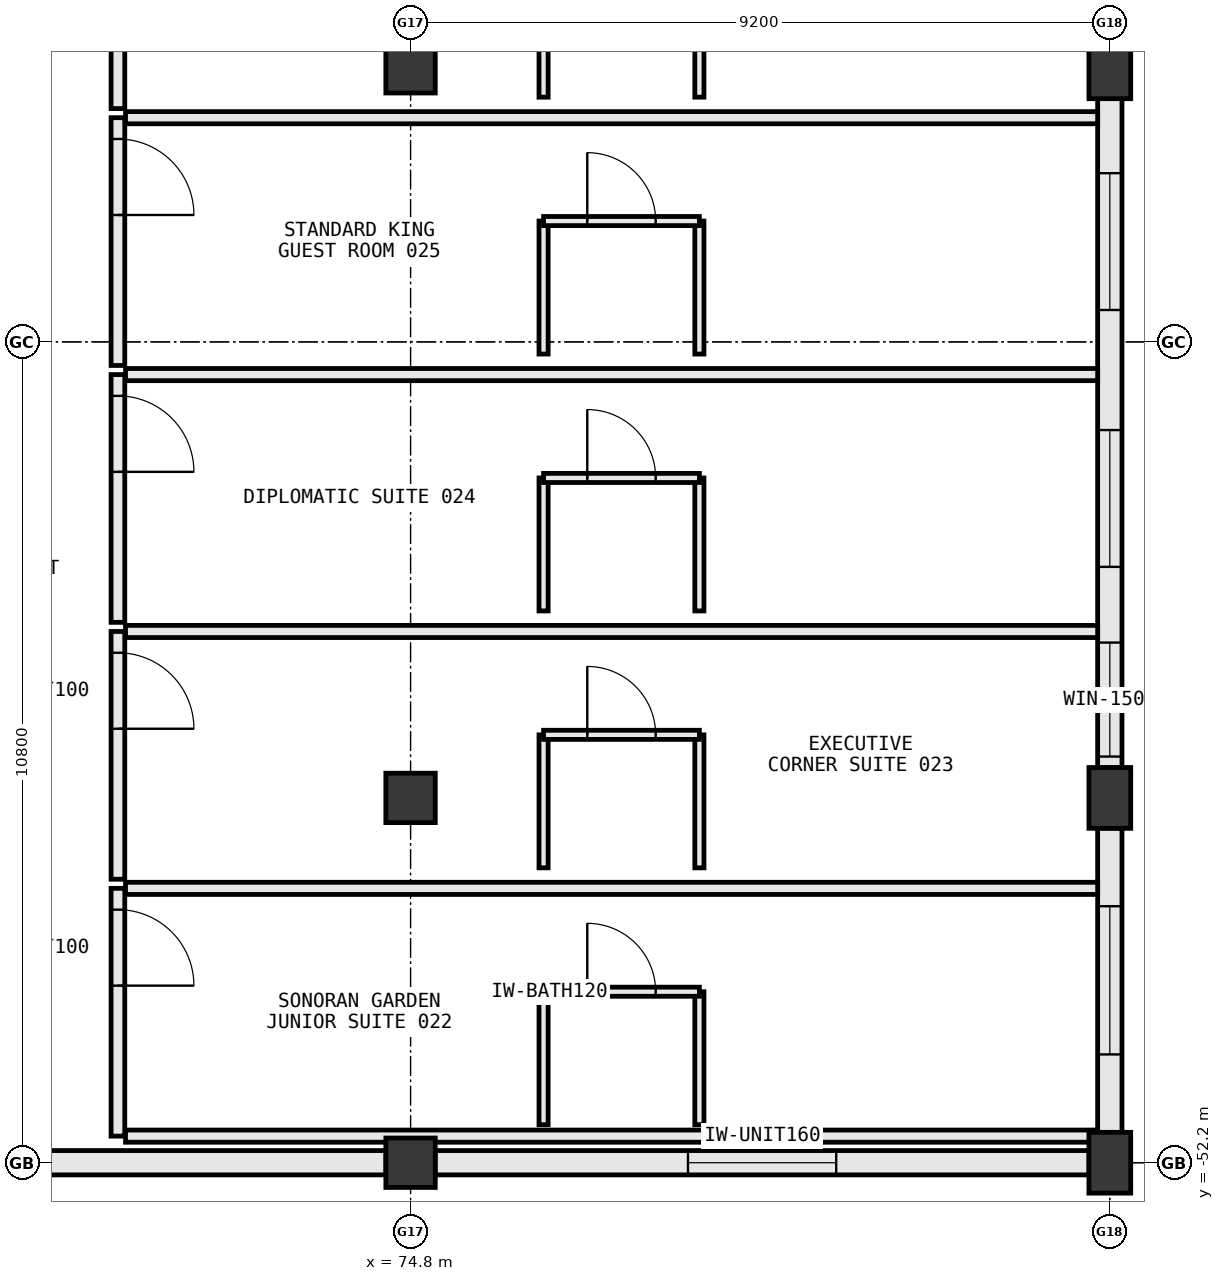
"""IFC4 building model, lengths in metres.
Left out: names, types, materials, properties, quantities, classifications, styles, units other than length and angle.
Written with IfcOpenShell. Run it as: python <this file> out.ifc"""

import sys

from ifc_helpers import new_model, si_unit, direction, frame, frame_2d, origin, origin_2d, place, context, subcontext, project, spatial, rectangle, extrude, element, fill, save


model = new_model("IFC4")
c1 = context("Model", 3, precision=1e-05, world=origin(), true_north=direction((0.0, 1.0)))
c2 = subcontext(c1, "Body", "Model", "MODEL_VIEW")
j1 = project(units=[si_unit("LENGTHUNIT", "METRE"), si_unit("PLANEANGLEUNIT", "RADIAN")], contexts=[c1])
p1 = place(None, origin())
s1 = spatial("IfcSite", under=j1, at=p1, CompositionType="ELEMENT")
p2 = place(p1, origin())
s2 = spatial("IfcBuilding", under=s1, at=p2, CompositionType="ELEMENT")
p3 = place(p2, frame((0.0, 0.0, 10.8)))
s3 = spatial("IfcBuildingStorey", under=s2, at=p3, CompositionType="ELEMENT", Elevation=10.8)
for number, where, z_axis, x_axis in (
    (1, (74.8, -52.2, 0.0), (0.0, 0.0, 1.0), (1.0, 0.0, 0.0)),
    (2, (74.8, -47.4, 0.0), (0.0, 0.0, 1.0), (1.0, 0.0, 0.0)),
    (3, (74.8, -37.8, 0.0), (0.0, 0.0, 1.0), (1.0, 0.0, 0.0)),
):
    element("IfcColumn", number, at=place(p3, frame(where, z_axis=z_axis, x_axis=x_axis)), inside=s3, PredefinedType="COLUMN", context=c2, shape_type="SweptSolid", body=[
        extrude(rectangle(XDim=0.65, YDim=0.65, at=origin_2d()), origin(), (0.0, 0.0, 1.0), 5.4),
    ])
for number, where, z_axis, x_axis in (
    (4, (84.0, -52.2, 0.0), (0.0, 0.0, 1.0), (1.0, 0.0, 0.0)),
    (5, (84.0, -47.4, 0.0), (0.0, 0.0, 1.0), (1.0, 0.0, 0.0)),
    (6, (84.0, -37.8, 0.0), (0.0, 0.0, 1.0), (1.0, 0.0, 0.0)),
):
    element("IfcColumn", number, at=place(p3, frame(where, z_axis=z_axis, x_axis=x_axis)), inside=s3, PredefinedType="PILASTER", context=c2, shape_type="SweptSolid", body=[
        extrude(rectangle(XDim=0.55, YDim=0.8, at=origin_2d()), origin(), (0.0, 0.0, 1.0), 5.4),
    ])
p4 = place(p3, frame((67.811, -52.2, 0.0), z_axis=(0.0, 0.0, 1.0), x_axis=(1.0, 0.0, 0.0)))
e7 = element("IfcWall", 7, at=p4, inside=s3, PredefinedType="STANDARD", context=c2, shape_type="SweptSolid", body=[
    extrude(rectangle(XDim=6.667, YDim=0.32, at=frame_2d((3.333, 0.0))), origin(), (0.0, 0.0, 1.0), 4.183),
])
p5 = place(p3, frame((75.123, -52.2, 0.0), z_axis=(0.0, 0.0, 1.0), x_axis=(1.0, 0.0, 0.0)))
e8 = element("IfcWall", 8, at=p5, inside=s3, PredefinedType="STANDARD", context=c2, shape_type="SweptSolid", body=[
    extrude(rectangle(XDim=8.604, YDim=0.32, at=frame_2d((4.302, 0.0))), origin(), (0.0, 0.0, 1.0), 4.183),
])
p6 = place(p5, frame((3.327, 0.0, 0.85)))
e9 = element("IfcOpeningElement", 9, at=p6, cuts=e8, PredefinedType="OPENING", context=c2, shape_type="SweptSolid", body=[
    extrude(rectangle(XDim=1.95, YDim=1.9, at=frame_2d((0.975, 0.95))), frame((0.0, 0.172, 0.0), z_axis=(0.0, -1.0, 0.0), x_axis=(1.0, 0.0, 0.0)), (0.0, 0.0, 1.0), 0.344),
])
p7 = place(p3, frame((84.0, -51.802, 0.0), z_axis=(0.0, 0.0, 1.0), x_axis=(0.0, 1.0, 0.0)))
e10 = element("IfcWall", 10, at=p7, inside=s3, PredefinedType="STANDARD", context=c2, shape_type="SweptSolid", body=[
    extrude(rectangle(XDim=4.004, YDim=0.32, at=frame_2d((2.002, 0.0))), origin(), (0.0, 0.0, 1.0), 4.332),
])
p8 = place(p7, frame((1.027, 0.0, 0.85)))
e11 = element("IfcOpeningElement", 11, at=p8, cuts=e10, PredefinedType="OPENING", context=c2, shape_type="SweptSolid", body=[
    extrude(rectangle(XDim=1.95, YDim=1.9, at=frame_2d((0.975, 0.95))), frame((0.0, 0.172, 0.0), z_axis=(0.0, -1.0, 0.0), x_axis=(1.0, 0.0, 0.0)), (0.0, 0.0, 1.0), 0.344),
])
p9 = place(p3, frame((84.0, -47.002, 0.0), z_axis=(0.0, 0.0, 1.0), x_axis=(0.0, 1.0, 0.0)))
e12 = element("IfcWall", 12, at=p9, inside=s3, PredefinedType="STANDARD", context=c2, shape_type="SweptSolid", body=[
    extrude(rectangle(XDim=8.804, YDim=0.32, at=frame_2d((4.402, 0.0))), origin(), (0.0, 0.0, 1.0), 4.332),
])
p10 = place(p9, frame((0.146, 0.0, 0.85)))
e13 = element("IfcOpeningElement", 13, at=p10, cuts=e12, PredefinedType="OPENING", context=c2, shape_type="SweptSolid", body=[
    extrude(rectangle(XDim=1.5, YDim=1.75, at=frame_2d((0.75, 0.875))), frame((0.0, 0.172, 0.0), z_axis=(0.0, -1.0, 0.0), x_axis=(1.0, 0.0, 0.0)), (0.0, 0.0, 1.0), 0.344),
])
p11 = place(p9, frame((2.642, 0.0, 0.85)))
e14 = element("IfcOpeningElement", 14, at=p11, cuts=e12, PredefinedType="OPENING", context=c2, shape_type="SweptSolid", body=[
    extrude(rectangle(XDim=1.8, YDim=1.85, at=frame_2d((0.9, 0.925))), frame((0.0, 0.172, 0.0), z_axis=(0.0, -1.0, 0.0), x_axis=(1.0, 0.0, 0.0)), (0.0, 0.0, 1.0), 0.344),
])
p12 = place(p9, frame((6.022, 0.0, 0.85)))
e15 = element("IfcOpeningElement", 15, at=p12, cuts=e12, PredefinedType="OPENING", context=c2, shape_type="SweptSolid", body=[
    extrude(rectangle(XDim=1.8, YDim=1.85, at=frame_2d((0.9, 0.925))), frame((0.0, 0.172, 0.0), z_axis=(0.0, -1.0, 0.0), x_axis=(1.0, 0.0, 0.0)), (0.0, 0.0, 1.0), 0.344),
])
p13 = place(p3, frame((70.95, -48.59, 0.0), z_axis=(0.0, 0.0, 1.0), x_axis=(0.0, -1.0, 0.0)))
e16 = element("IfcWall", 16, at=p13, inside=s3, PredefinedType="PARTITIONING", context=c2, shape_type="SweptSolid", body=[
    extrude(rectangle(XDim=3.26, YDim=0.18, at=frame_2d((1.63, 0.0))), origin(), (0.0, 0.0, 1.0), 4.8),
])
p14 = place(p13, frame((0.28, 0.0, 0.0)))
e17 = element("IfcOpeningElement", 17, at=p14, cuts=e16, PredefinedType="OPENING", context=c2, shape_type="SweptSolid", body=[
    extrude(rectangle(XDim=1.0, YDim=2.2, at=frame_2d((0.5, 1.1))), frame((0.0, 0.102, 0.0), z_axis=(0.0, -1.0, 0.0), x_axis=(1.0, 0.0, 0.0)), (0.0, 0.0, 1.0), 0.204),
])
p15 = place(p3, frame((71.05, -51.85, 0.0), z_axis=(0.0, 0.0, 1.0), x_axis=(1.0, 0.0, 0.0)))
e18 = element("IfcWall", 18, at=p15, inside=s3, PredefinedType="PARTITIONING", context=c2, shape_type="SweptSolid", body=[
    extrude(rectangle(XDim=12.79, YDim=0.16, at=frame_2d((6.395, 0.0))), origin(), (0.0, 0.0, 1.0), 4.183),
])
p16 = place(p3, frame((71.05, -48.59, 0.0), z_axis=(0.0, 0.0, 1.0), x_axis=(1.0, 0.0, 0.0)))
e19 = element("IfcWall", 19, at=p16, inside=s3, PredefinedType="PARTITIONING", context=c2, shape_type="SweptSolid", body=[
    extrude(rectangle(XDim=12.79, YDim=0.16, at=frame_2d((6.395, 0.0))), origin(), (0.0, 0.0, 1.0), 4.8),
])
for number, where, z_axis, x_axis in (
    (20, (76.55, -51.7, 0.0), (0.0, 0.0, 1.0), (0.0, 1.0, 0.0)),
    (21, (78.6, -51.7, 0.0), (0.0, 0.0, 1.0), (0.0, 1.0, 0.0)),
):
    element("IfcWall", number, at=place(p3, frame(where, z_axis=z_axis, x_axis=x_axis)), inside=s3, PredefinedType="PARTITIONING", context=c2, shape_type="SweptSolid", body=[
        extrude(rectangle(XDim=1.75, YDim=0.12, at=frame_2d((0.875, 0.0))), origin(), (0.0, 0.0, 1.0), 4.8),
    ])
p17 = place(p3, frame((76.55, -49.95, 0.0), z_axis=(0.0, 0.0, 1.0), x_axis=(1.0, 0.0, 0.0)))
e22 = element("IfcWall", 22, at=p17, inside=s3, PredefinedType="PARTITIONING", context=c2, shape_type="SweptSolid", body=[
    extrude(rectangle(XDim=2.05, YDim=0.12, at=frame_2d((1.025, 0.0))), origin(), (0.0, 0.0, 1.0), 4.8),
])
p18 = place(p17, frame((0.575, 0.0, 0.0)))
e23 = element("IfcOpeningElement", 23, at=p18, cuts=e22, PredefinedType="OPENING", context=c2, shape_type="SweptSolid", body=[
    extrude(rectangle(XDim=0.9, YDim=2.15, at=frame_2d((0.45, 1.075))), frame((0.0, 0.072, 0.0), z_axis=(0.0, -1.0, 0.0), x_axis=(1.0, 0.0, 0.0)), (0.0, 0.0, 1.0), 0.144),
])
p19 = place(p3, frame((70.95, -45.21, 0.0), z_axis=(0.0, 0.0, 1.0), x_axis=(0.0, -1.0, 0.0)))
e24 = element("IfcWall", 24, at=p19, inside=s3, PredefinedType="PARTITIONING", context=c2, shape_type="SweptSolid", body=[
    extrude(rectangle(XDim=3.26, YDim=0.18, at=frame_2d((1.63, 0.0))), origin(), (0.0, 0.0, 1.0), 4.8),
])
p20 = place(p19, frame((0.28, 0.0, 0.0)))
e25 = element("IfcOpeningElement", 25, at=p20, cuts=e24, PredefinedType="OPENING", context=c2, shape_type="SweptSolid", body=[
    extrude(rectangle(XDim=1.0, YDim=2.2, at=frame_2d((0.5, 1.1))), frame((0.0, 0.102, 0.0), z_axis=(0.0, -1.0, 0.0), x_axis=(1.0, 0.0, 0.0)), (0.0, 0.0, 1.0), 0.204),
])
p21 = place(p3, frame((71.05, -45.21, 0.0), z_axis=(0.0, 0.0, 1.0), x_axis=(1.0, 0.0, 0.0)))
e26 = element("IfcWall", 26, at=p21, inside=s3, PredefinedType="PARTITIONING", context=c2, shape_type="SweptSolid", body=[
    extrude(rectangle(XDim=12.79, YDim=0.16, at=frame_2d((6.395, 0.0))), origin(), (0.0, 0.0, 1.0), 4.8),
])
for number, where, z_axis, x_axis in (
    (27, (76.55, -48.32, 0.0), (0.0, 0.0, 1.0), (0.0, 1.0, 0.0)),
    (28, (78.6, -48.32, 0.0), (0.0, 0.0, 1.0), (0.0, 1.0, 0.0)),
):
    element("IfcWall", number, at=place(p3, frame(where, z_axis=z_axis, x_axis=x_axis)), inside=s3, PredefinedType="PARTITIONING", context=c2, shape_type="SweptSolid", body=[
        extrude(rectangle(XDim=1.75, YDim=0.12, at=frame_2d((0.875, 0.0))), origin(), (0.0, 0.0, 1.0), 4.8),
    ])
p22 = place(p3, frame((76.55, -46.57, 0.0), z_axis=(0.0, 0.0, 1.0), x_axis=(1.0, 0.0, 0.0)))
e29 = element("IfcWall", 29, at=p22, inside=s3, PredefinedType="PARTITIONING", context=c2, shape_type="SweptSolid", body=[
    extrude(rectangle(XDim=2.05, YDim=0.12, at=frame_2d((1.025, 0.0))), origin(), (0.0, 0.0, 1.0), 4.8),
])
p23 = place(p22, frame((0.575, 0.0, 0.0)))
e30 = element("IfcOpeningElement", 30, at=p23, cuts=e29, PredefinedType="OPENING", context=c2, shape_type="SweptSolid", body=[
    extrude(rectangle(XDim=0.9, YDim=2.15, at=frame_2d((0.45, 1.075))), frame((0.0, 0.072, 0.0), z_axis=(0.0, -1.0, 0.0), x_axis=(1.0, 0.0, 0.0)), (0.0, 0.0, 1.0), 0.144),
])
p24 = place(p3, frame((70.95, -41.83, 0.0), z_axis=(0.0, 0.0, 1.0), x_axis=(0.0, -1.0, 0.0)))
e31 = element("IfcWall", 31, at=p24, inside=s3, PredefinedType="PARTITIONING", context=c2, shape_type="SweptSolid", body=[
    extrude(rectangle(XDim=3.26, YDim=0.18, at=frame_2d((1.63, 0.0))), origin(), (0.0, 0.0, 1.0), 4.8),
])
p25 = place(p24, frame((0.28, 0.0, 0.0)))
e32 = element("IfcOpeningElement", 32, at=p25, cuts=e31, PredefinedType="OPENING", context=c2, shape_type="SweptSolid", body=[
    extrude(rectangle(XDim=1.0, YDim=2.2, at=frame_2d((0.5, 1.1))), frame((0.0, 0.102, 0.0), z_axis=(0.0, -1.0, 0.0), x_axis=(1.0, 0.0, 0.0)), (0.0, 0.0, 1.0), 0.204),
])
p26 = place(p3, frame((71.05, -41.83, 0.0), z_axis=(0.0, 0.0, 1.0), x_axis=(1.0, 0.0, 0.0)))
e33 = element("IfcWall", 33, at=p26, inside=s3, PredefinedType="PARTITIONING", context=c2, shape_type="SweptSolid", body=[
    extrude(rectangle(XDim=12.79, YDim=0.16, at=frame_2d((6.395, 0.0))), origin(), (0.0, 0.0, 1.0), 4.8),
])
for number, where, z_axis, x_axis in (
    (34, (76.55, -44.94, 0.0), (0.0, 0.0, 1.0), (0.0, 1.0, 0.0)),
    (35, (78.6, -44.94, 0.0), (0.0, 0.0, 1.0), (0.0, 1.0, 0.0)),
):
    element("IfcWall", number, at=place(p3, frame(where, z_axis=z_axis, x_axis=x_axis)), inside=s3, PredefinedType="PARTITIONING", context=c2, shape_type="SweptSolid", body=[
        extrude(rectangle(XDim=1.75, YDim=0.12, at=frame_2d((0.875, 0.0))), origin(), (0.0, 0.0, 1.0), 4.8),
    ])
p27 = place(p3, frame((76.55, -43.19, 0.0), z_axis=(0.0, 0.0, 1.0), x_axis=(1.0, 0.0, 0.0)))
e36 = element("IfcWall", 36, at=p27, inside=s3, PredefinedType="PARTITIONING", context=c2, shape_type="SweptSolid", body=[
    extrude(rectangle(XDim=2.05, YDim=0.12, at=frame_2d((1.025, 0.0))), origin(), (0.0, 0.0, 1.0), 4.8),
])
p28 = place(p27, frame((0.575, 0.0, 0.0)))
e37 = element("IfcOpeningElement", 37, at=p28, cuts=e36, PredefinedType="OPENING", context=c2, shape_type="SweptSolid", body=[
    extrude(rectangle(XDim=0.9, YDim=2.15, at=frame_2d((0.45, 1.075))), frame((0.0, 0.072, 0.0), z_axis=(0.0, -1.0, 0.0), x_axis=(1.0, 0.0, 0.0)), (0.0, 0.0, 1.0), 0.144),
])
p29 = place(p3, frame((70.95, -38.45, 0.0), z_axis=(0.0, 0.0, 1.0), x_axis=(0.0, -1.0, 0.0)))
e38 = element("IfcWall", 38, at=p29, inside=s3, PredefinedType="PARTITIONING", context=c2, shape_type="SweptSolid", body=[
    extrude(rectangle(XDim=3.26, YDim=0.18, at=frame_2d((1.63, 0.0))), origin(), (0.0, 0.0, 1.0), 4.8),
])
p30 = place(p29, frame((0.28, 0.0, 0.0)))
e39 = element("IfcOpeningElement", 39, at=p30, cuts=e38, PredefinedType="OPENING", context=c2, shape_type="SweptSolid", body=[
    extrude(rectangle(XDim=1.0, YDim=2.2, at=frame_2d((0.5, 1.1))), frame((0.0, 0.102, 0.0), z_axis=(0.0, -1.0, 0.0), x_axis=(1.0, 0.0, 0.0)), (0.0, 0.0, 1.0), 0.204),
])
p31 = place(p3, frame((71.05, -38.45, 0.0), z_axis=(0.0, 0.0, 1.0), x_axis=(1.0, 0.0, 0.0)))
e40 = element("IfcWall", 40, at=p31, inside=s3, PredefinedType="PARTITIONING", context=c2, shape_type="SweptSolid", body=[
    extrude(rectangle(XDim=12.79, YDim=0.16, at=frame_2d((6.395, 0.0))), origin(), (0.0, 0.0, 1.0), 4.8),
])
for number, where, z_axis, x_axis in (
    (41, (76.55, -41.56, 0.0), (0.0, 0.0, 1.0), (0.0, 1.0, 0.0)),
    (42, (78.6, -41.56, 0.0), (0.0, 0.0, 1.0), (0.0, 1.0, 0.0)),
):
    element("IfcWall", number, at=place(p3, frame(where, z_axis=z_axis, x_axis=x_axis)), inside=s3, PredefinedType="PARTITIONING", context=c2, shape_type="SweptSolid", body=[
        extrude(rectangle(XDim=1.75, YDim=0.12, at=frame_2d((0.875, 0.0))), origin(), (0.0, 0.0, 1.0), 4.8),
    ])
p32 = place(p3, frame((76.55, -39.81, 0.0), z_axis=(0.0, 0.0, 1.0), x_axis=(1.0, 0.0, 0.0)))
e43 = element("IfcWall", 43, at=p32, inside=s3, PredefinedType="PARTITIONING", context=c2, shape_type="SweptSolid", body=[
    extrude(rectangle(XDim=2.05, YDim=0.12, at=frame_2d((1.025, 0.0))), origin(), (0.0, 0.0, 1.0), 4.8),
])
p33 = place(p32, frame((0.575, 0.0, 0.0)))
e44 = element("IfcOpeningElement", 44, at=p33, cuts=e43, PredefinedType="OPENING", context=c2, shape_type="SweptSolid", body=[
    extrude(rectangle(XDim=0.9, YDim=2.15, at=frame_2d((0.45, 1.075))), frame((0.0, 0.072, 0.0), z_axis=(0.0, -1.0, 0.0), x_axis=(1.0, 0.0, 0.0)), (0.0, 0.0, 1.0), 0.144),
])
p34 = place(p3, frame((70.95, -35.07, 0.0), z_axis=(0.0, 0.0, 1.0), x_axis=(0.0, -1.0, 0.0)))
e45 = element("IfcWall", 45, at=p34, inside=s3, PredefinedType="PARTITIONING", context=c2, shape_type="SweptSolid", body=[
    extrude(rectangle(XDim=3.26, YDim=0.18, at=frame_2d((1.63, 0.0))), origin(), (0.0, 0.0, 1.0), 4.8),
])
p35 = place(p34, frame((0.28, 0.0, 0.0)))
e46 = element("IfcOpeningElement", 46, at=p35, cuts=e45, PredefinedType="OPENING", context=c2, shape_type="SweptSolid", body=[
    extrude(rectangle(XDim=1.0, YDim=2.2, at=frame_2d((0.5, 1.1))), frame((0.0, 0.102, 0.0), z_axis=(0.0, -1.0, 0.0), x_axis=(1.0, 0.0, 0.0)), (0.0, 0.0, 1.0), 0.204),
])
for number, where, z_axis, x_axis in (
    (47, (76.55, -38.18, 0.0), (0.0, 0.0, 1.0), (0.0, 1.0, 0.0)),
    (48, (78.6, -38.18, 0.0), (0.0, 0.0, 1.0), (0.0, 1.0, 0.0)),
):
    element("IfcWall", number, at=place(p3, frame(where, z_axis=z_axis, x_axis=x_axis)), inside=s3, PredefinedType="PARTITIONING", context=c2, shape_type="SweptSolid", body=[
        extrude(rectangle(XDim=1.75, YDim=0.12, at=frame_2d((0.875, 0.0))), origin(), (0.0, 0.0, 1.0), 4.8),
    ])
p36 = place(p6, origin())
e49 = element("IfcWindow", 49, at=p36, inside=s3, PartitioningType="DOUBLE_PANEL_VERTICAL", PredefinedType="WINDOW", context=c2, shape_type="SweptSolid", body=[
    extrude(rectangle(XDim=1.95, YDim=1.9, at=frame_2d((0.975, 0.95))), frame((0.0, 0.03, 0.0), z_axis=(0.0, -1.0, 0.0), x_axis=(1.0, 0.0, 0.0)), (0.0, 0.0, 1.0), 0.06),
])
fill(e9, e49)
p37 = place(p8, origin())
e50 = element("IfcWindow", 50, at=p37, inside=s3, PartitioningType="DOUBLE_PANEL_VERTICAL", PredefinedType="WINDOW", context=c2, shape_type="SweptSolid", body=[
    extrude(rectangle(XDim=1.95, YDim=1.9, at=frame_2d((0.975, 0.95))), frame((0.0, 0.03, 0.0), z_axis=(0.0, -1.0, 0.0), x_axis=(1.0, 0.0, 0.0)), (0.0, 0.0, 1.0), 0.06),
])
fill(e11, e50)
p38 = place(p10, origin())
e51 = element("IfcWindow", 51, at=p38, inside=s3, PartitioningType="SINGLE_PANEL", PredefinedType="WINDOW", context=c2, shape_type="SweptSolid", body=[
    extrude(rectangle(XDim=1.5, YDim=1.75, at=frame_2d((0.75, 0.875))), frame((0.0, 0.03, 0.0), z_axis=(0.0, -1.0, 0.0), x_axis=(1.0, 0.0, 0.0)), (0.0, 0.0, 1.0), 0.06),
])
fill(e13, e51)
p39 = place(p11, origin())
e52 = element("IfcWindow", 52, at=p39, inside=s3, PartitioningType="SINGLE_PANEL", PredefinedType="WINDOW", context=c2, shape_type="SweptSolid", body=[
    extrude(rectangle(XDim=1.8, YDim=1.85, at=frame_2d((0.9, 0.925))), frame((0.0, 0.03, 0.0), z_axis=(0.0, -1.0, 0.0), x_axis=(1.0, 0.0, 0.0)), (0.0, 0.0, 1.0), 0.06),
])
fill(e14, e52)
p40 = place(p12, origin())
e53 = element("IfcWindow", 53, at=p40, inside=s3, PartitioningType="SINGLE_PANEL", PredefinedType="WINDOW", context=c2, shape_type="SweptSolid", body=[
    extrude(rectangle(XDim=1.8, YDim=1.85, at=frame_2d((0.9, 0.925))), frame((0.0, 0.03, 0.0), z_axis=(0.0, -1.0, 0.0), x_axis=(1.0, 0.0, 0.0)), (0.0, 0.0, 1.0), 0.06),
])
fill(e15, e53)
p41 = place(p14, origin())
e54 = element("IfcDoor", 54, at=p41, inside=s3, OperationType="SINGLE_SWING_RIGHT", PredefinedType="DOOR", context=c2, shape_type="SweptSolid", body=[
    extrude(rectangle(XDim=1.0, YDim=2.2, at=frame_2d((0.5, 1.1))), frame((0.0, 0.025, 0.0), z_axis=(0.0, -1.0, 0.0), x_axis=(1.0, 0.0, 0.0)), (0.0, 0.0, 1.0), 0.05),
])
fill(e17, e54)
p42 = place(p18, origin())
e55 = element("IfcDoor", 55, at=p42, inside=s3, OperationType="SINGLE_SWING_LEFT", PredefinedType="DOOR", context=c2, shape_type="SweptSolid", body=[
    extrude(rectangle(XDim=0.9, YDim=2.15, at=frame_2d((0.45, 1.075))), frame((0.0, 0.025, 0.0), z_axis=(0.0, -1.0, 0.0), x_axis=(1.0, 0.0, 0.0)), (0.0, 0.0, 1.0), 0.05),
])
fill(e23, e55)
p43 = place(p20, origin())
e56 = element("IfcDoor", 56, at=p43, inside=s3, OperationType="SINGLE_SWING_RIGHT", PredefinedType="DOOR", context=c2, shape_type="SweptSolid", body=[
    extrude(rectangle(XDim=1.0, YDim=2.2, at=frame_2d((0.5, 1.1))), frame((0.0, 0.025, 0.0), z_axis=(0.0, -1.0, 0.0), x_axis=(1.0, 0.0, 0.0)), (0.0, 0.0, 1.0), 0.05),
])
fill(e25, e56)
p44 = place(p23, origin())
e57 = element("IfcDoor", 57, at=p44, inside=s3, OperationType="SINGLE_SWING_LEFT", PredefinedType="DOOR", context=c2, shape_type="SweptSolid", body=[
    extrude(rectangle(XDim=0.9, YDim=2.15, at=frame_2d((0.45, 1.075))), frame((0.0, 0.025, 0.0), z_axis=(0.0, -1.0, 0.0), x_axis=(1.0, 0.0, 0.0)), (0.0, 0.0, 1.0), 0.05),
])
fill(e30, e57)
p45 = place(p25, origin())
e58 = element("IfcDoor", 58, at=p45, inside=s3, OperationType="SINGLE_SWING_RIGHT", PredefinedType="DOOR", context=c2, shape_type="SweptSolid", body=[
    extrude(rectangle(XDim=1.0, YDim=2.2, at=frame_2d((0.5, 1.1))), frame((0.0, 0.025, 0.0), z_axis=(0.0, -1.0, 0.0), x_axis=(1.0, 0.0, 0.0)), (0.0, 0.0, 1.0), 0.05),
])
fill(e32, e58)
p46 = place(p28, origin())
e59 = element("IfcDoor", 59, at=p46, inside=s3, OperationType="SINGLE_SWING_LEFT", PredefinedType="DOOR", context=c2, shape_type="SweptSolid", body=[
    extrude(rectangle(XDim=0.9, YDim=2.15, at=frame_2d((0.45, 1.075))), frame((0.0, 0.025, 0.0), z_axis=(0.0, -1.0, 0.0), x_axis=(1.0, 0.0, 0.0)), (0.0, 0.0, 1.0), 0.05),
])
fill(e37, e59)
p47 = place(p30, origin())
e60 = element("IfcDoor", 60, at=p47, inside=s3, OperationType="SINGLE_SWING_RIGHT", PredefinedType="DOOR", context=c2, shape_type="SweptSolid", body=[
    extrude(rectangle(XDim=1.0, YDim=2.2, at=frame_2d((0.5, 1.1))), frame((0.0, 0.025, 0.0), z_axis=(0.0, -1.0, 0.0), x_axis=(1.0, 0.0, 0.0)), (0.0, 0.0, 1.0), 0.05),
])
fill(e39, e60)
p48 = place(p33, origin())
e61 = element("IfcDoor", 61, at=p48, inside=s3, OperationType="SINGLE_SWING_LEFT", PredefinedType="DOOR", context=c2, shape_type="SweptSolid", body=[
    extrude(rectangle(XDim=0.9, YDim=2.15, at=frame_2d((0.45, 1.075))), frame((0.0, 0.025, 0.0), z_axis=(0.0, -1.0, 0.0), x_axis=(1.0, 0.0, 0.0)), (0.0, 0.0, 1.0), 0.05),
])
fill(e44, e61)
save(model, sys.argv[1])
